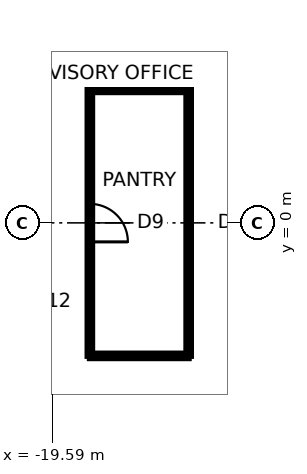
"""IFC4 building model, lengths in metres.
Left out: names, types, materials, properties, quantities, classifications, styles, units other than length and angle.
Written with IfcOpenShell. Run it as: python <this file> out.ifc"""

import sys

from ifc_helpers import new_model, si_unit, direction, frame, frame_2d, origin, place, context, subcontext, project, spatial, rectangle, extrude, element, fill, save


model = new_model("IFC4")
c1 = context("Model", 3, precision=1e-05, world=origin(), true_north=direction((0.0, 1.0)))
c2 = subcontext(c1, "Body", "Model", "MODEL_VIEW")
j1 = project(units=[si_unit("LENGTHUNIT", "METRE"), si_unit("PLANEANGLEUNIT", "RADIAN")], contexts=[c1])
p1 = place(None, origin())
s1 = spatial("IfcSite", under=j1, at=p1, CompositionType="ELEMENT")
p2 = place(p1, origin())
s2 = spatial("IfcBuilding", under=s1, at=p2, CompositionType="ELEMENT")
p3 = place(p2, frame((0.0, 0.0, 187.7)))
s3 = spatial("IfcBuildingStorey", under=s2, at=p3, CompositionType="ELEMENT", Elevation=187.7)
for number, where, z_axis, x_axis in (
    (1, (-16.0, -3.5, 0.0), (0.0, 0.0, 1.0), (-1.0, 0.0, 0.0)),
    (2, (-18.6, 3.5, 0.0), (0.0, 0.0, 1.0), (1.0, 0.0, 0.0)),
):
    element("IfcWall", number, at=place(p3, frame(where, z_axis=z_axis, x_axis=x_axis)), inside=s3, PredefinedType="PARTITIONING", context=c2, shape_type="SweptSolid", body=[
        extrude(rectangle(XDim=2.6, YDim=0.12, at=frame_2d((1.3, 0.0))), origin(), (0.0, 0.0, 1.0), 3.74),
    ])
p4 = place(p3, frame((-18.6, -3.5, 0.0), z_axis=(0.0, 0.0, 1.0), x_axis=(0.0, 1.0, 0.0)))
e3 = element("IfcWall", 3, at=p4, inside=s3, PredefinedType="PARTITIONING", context=c2, shape_type="SweptSolid", body=[
    extrude(rectangle(XDim=7.0, YDim=0.12, at=frame_2d((3.5, 0.0))), origin(), (0.0, 0.0, 1.0), 3.334),
])
p5 = place(p4, frame((3.0, 0.0, 0.0)))
e4 = element("IfcOpeningElement", 4, at=p5, cuts=e3, PredefinedType="OPENING", context=c2, shape_type="SweptSolid", body=[
    extrude(rectangle(XDim=1.0, YDim=2.4, at=frame_2d((0.5, 1.2))), frame((0.0, 0.07, 0.0), z_axis=(0.0, -1.0, 0.0), x_axis=(1.0, 0.0, 0.0)), (0.0, 0.0, 1.0), 0.14),
])
p6 = place(p3, frame((-16.0, 3.5, 0.0), z_axis=(0.0, 0.0, 1.0), x_axis=(0.0, -1.0, 0.0)))
e5 = element("IfcWall", 5, at=p6, inside=s3, PredefinedType="PARTITIONING", context=c2, shape_type="SweptSolid", body=[
    extrude(rectangle(XDim=7.0, YDim=0.12, at=frame_2d((3.5, 0.0))), origin(), (0.0, 0.0, 1.0), 3.74),
])
p7 = place(p5, frame((1.0, 0.0, 0.0), z_axis=(0.0, 0.0, 1.0), x_axis=(-1.0, 0.0, 0.0)))
e6 = element("IfcDoor", 6, at=p7, inside=s3, OperationType="SINGLE_SWING_RIGHT", PredefinedType="DOOR", context=c2, shape_type="SweptSolid", body=[
    extrude(rectangle(XDim=1.0, YDim=2.4, at=frame_2d((0.5, 1.2))), frame((0.0, 0.025, 0.0), z_axis=(0.0, -1.0, 0.0), x_axis=(1.0, 0.0, 0.0)), (0.0, 0.0, 1.0), 0.05),
])
fill(e4, e6)
save(model, sys.argv[1])
